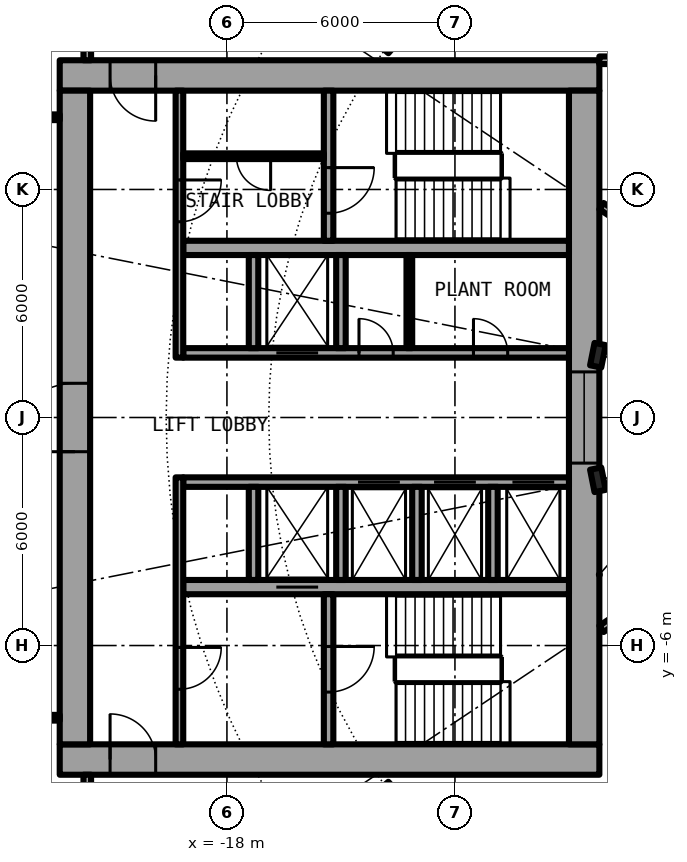
"""IFC4 building model, lengths in metres.
Left out: names, types, materials, properties, quantities, classifications, styles, units other than length and angle.
Written with IfcOpenShell. Run it as: python <this file> out.ifc"""

import sys

from ifc_helpers import new_model, si_unit, direction, frame, frame_2d, origin, origin_2d, place, context, subcontext, project, spatial, rectangle, i_section, extrude, element, fill, save


model = new_model("IFC4")
c1 = context("Model", 3, precision=1e-05, world=origin(), true_north=direction((0.0, 1.0)))
c2 = subcontext(c1, "Body", "Model", "MODEL_VIEW")
j1 = project(units=[si_unit("LENGTHUNIT", "METRE"), si_unit("PLANEANGLEUNIT", "RADIAN")], contexts=[c1])
p1 = place(None, origin())
s1 = spatial("IfcSite", under=j1, at=p1, CompositionType="ELEMENT")
p2 = place(p1, origin())
s2 = spatial("IfcBuilding", under=s1, at=p2, CompositionType="ELEMENT")
p3 = place(p2, frame((0.0, 0.0, 18.3)))
s3 = spatial("IfcBuildingStorey", under=s2, at=p3, CompositionType="ELEMENT", Elevation=18.3)
for number, where, z_axis, x_axis in (
    (1, (-8.239, 1.639, 0.0), (0.0, 0.0, 1.0), (-0.981, 0.195, 0.0)),
    (2, (-8.239, -1.639, 0.0), (0.0, 0.0, 1.0), (-0.981, -0.195, 0.0)),
):
    element("IfcColumn", number, at=place(p3, frame(where, z_axis=z_axis, x_axis=x_axis)), inside=s3, PredefinedType="COLUMN", context=c2, shape_type="SweptSolid", body=[
        extrude(i_section(OverallWidth=0.3, OverallDepth=0.6, WebThickness=0.015, FlangeThickness=0.03, FilletRadius=0.027, at=origin_2d()), origin(), (0.0, 0.0, 1.0), 4.5),
    ])
p4 = place(p3, frame((-22.4, -9.0, 0.0), z_axis=(0.0, 0.0, 1.0), x_axis=(1.0, 0.0, 0.0)))
e3 = element("IfcWall", 3, at=p4, inside=s3, PredefinedType="SHEAR", context=c2, shape_type="SweptSolid", body=[
    extrude(rectangle(XDim=14.2, YDim=0.8, at=frame_2d((7.1, 0.0))), origin(), (0.0, 0.0, 1.0), 4.5),
])
p5 = place(p4, frame((1.325, 0.0, 0.0)))
e4 = element("IfcOpeningElement", 4, at=p5, cuts=e3, PredefinedType="OPENING", context=c2, shape_type="SweptSolid", body=[
    extrude(rectangle(XDim=1.2, YDim=2.3, at=frame_2d((0.6, 1.15))), frame((0.0, 0.41, 0.0), z_axis=(0.0, -1.0, 0.0), x_axis=(1.0, 0.0, 0.0)), (0.0, 0.0, 1.0), 0.82),
])
p6 = place(p3, frame((-8.2, 9.0, 0.0), z_axis=(0.0, 0.0, 1.0), x_axis=(-1.0, 0.0, 0.0)))
e5 = element("IfcWall", 5, at=p6, inside=s3, PredefinedType="SHEAR", context=c2, shape_type="SweptSolid", body=[
    extrude(rectangle(XDim=14.2, YDim=0.8, at=frame_2d((7.1, 0.0))), origin(), (0.0, 0.0, 1.0), 4.5),
])
p7 = place(p6, frame((11.675, 0.0, 0.0)))
e6 = element("IfcOpeningElement", 6, at=p7, cuts=e5, PredefinedType="OPENING", context=c2, shape_type="SweptSolid", body=[
    extrude(rectangle(XDim=1.2, YDim=2.3, at=frame_2d((0.6, 1.15))), frame((0.0, 0.41, 0.0), z_axis=(0.0, -1.0, 0.0), x_axis=(1.0, 0.0, 0.0)), (0.0, 0.0, 1.0), 0.82),
])
p8 = place(p3, frame((-22.0, -8.6, 0.0), z_axis=(0.0, 0.0, 1.0), x_axis=(0.0, 1.0, 0.0)))
e7 = element("IfcWall", 7, at=p8, inside=s3, PredefinedType="SHEAR", context=c2, shape_type="SweptSolid", body=[
    extrude(rectangle(XDim=17.2, YDim=0.8, at=frame_2d((8.6, 0.0))), origin(), (0.0, 0.0, 1.0), 4.5),
])
p9 = place(p8, frame((7.7, 0.0, 0.0)))
e8 = element("IfcOpeningElement", 8, at=p9, cuts=e7, PredefinedType="OPENING", context=c2, shape_type="SweptSolid", body=[
    extrude(rectangle(XDim=1.8, YDim=2.3, at=frame_2d((0.9, 1.15))), frame((0.0, 0.41, 0.0), z_axis=(0.0, -1.0, 0.0), x_axis=(1.0, 0.0, 0.0)), (0.0, 0.0, 1.0), 0.82),
])
p10 = place(p3, frame((-8.6, 8.6, 0.0), z_axis=(0.0, 0.0, 1.0), x_axis=(0.0, -1.0, 0.0)))
e9 = element("IfcWall", 9, at=p10, inside=s3, PredefinedType="SHEAR", context=c2, shape_type="SweptSolid", body=[
    extrude(rectangle(XDim=17.2, YDim=0.8, at=frame_2d((8.6, 0.0))), origin(), (0.0, 0.0, 1.0), 4.5),
])
p11 = place(p10, frame((7.4, 0.0, 0.1)))
e10 = element("IfcOpeningElement", 10, at=p11, cuts=e9, PredefinedType="OPENING", context=c2, shape_type="SweptSolid", body=[
    extrude(rectangle(XDim=2.4, YDim=2.2, at=frame_2d((1.2, 1.1))), frame((0.0, 0.41, 0.0), z_axis=(0.0, -1.0, 0.0), x_axis=(1.0, 0.0, 0.0)), (0.0, 0.0, 1.0), 0.82),
])
p12 = place(p3, frame((-9.0, -1.7, 0.0), z_axis=(0.0, 0.0, 1.0), x_axis=(-1.0, 0.0, 0.0)))
e11 = element("IfcWall", 11, at=p12, inside=s3, PredefinedType="SHEAR", context=c2, shape_type="SweptSolid", body=[
    extrude(rectangle(XDim=10.15, YDim=0.25, at=frame_2d((5.075, 0.0))), origin(), (0.0, 0.0, 1.0), 4.5),
])
p13 = place(p12, frame((0.387, 0.0, 0.0)))
e12 = element("IfcOpeningElement", 12, at=p13, cuts=e11, PredefinedType="OPENING", context=c2, shape_type="SweptSolid", body=[
    extrude(rectangle(XDim=1.1, YDim=2.3, at=frame_2d((0.55, 1.15))), frame((0.0, 0.135, 0.0), z_axis=(0.0, -1.0, 0.0), x_axis=(1.0, 0.0, 0.0)), (0.0, 0.0, 1.0), 0.27),
])
p14 = place(p12, frame((2.45, 0.0, 0.0)))
e13 = element("IfcOpeningElement", 13, at=p14, cuts=e11, PredefinedType="OPENING", context=c2, shape_type="SweptSolid", body=[
    extrude(rectangle(XDim=1.1, YDim=2.3, at=frame_2d((0.55, 1.15))), frame((0.0, 0.135, 0.0), z_axis=(0.0, -1.0, 0.0), x_axis=(1.0, 0.0, 0.0)), (0.0, 0.0, 1.0), 0.27),
])
p15 = place(p12, frame((4.45, 0.0, 0.0)))
e14 = element("IfcOpeningElement", 14, at=p15, cuts=e11, PredefinedType="OPENING", context=c2, shape_type="SweptSolid", body=[
    extrude(rectangle(XDim=1.1, YDim=2.3, at=frame_2d((0.55, 1.15))), frame((0.0, 0.135, 0.0), z_axis=(0.0, -1.0, 0.0), x_axis=(1.0, 0.0, 0.0)), (0.0, 0.0, 1.0), 0.27),
])
p16 = place(p3, frame((-9.0, -4.462, 0.0), z_axis=(0.0, 0.0, 1.0), x_axis=(-1.0, 0.0, 0.0)))
e15 = element("IfcWall", 15, at=p16, inside=s3, PredefinedType="SHEAR", context=c2, shape_type="SweptSolid", body=[
    extrude(rectangle(XDim=10.15, YDim=0.375, at=frame_2d((5.075, 0.0))), origin(), (0.0, 0.0, 1.0), 4.5),
])
p17 = place(p16, frame((6.6, 0.0, 0.0)))
e16 = element("IfcOpeningElement", 16, at=p17, cuts=e15, PredefinedType="OPENING", context=c2, shape_type="SweptSolid", body=[
    extrude(rectangle(XDim=1.1, YDim=2.3, at=frame_2d((0.55, 1.15))), frame((0.0, 0.198, 0.0), z_axis=(0.0, -1.0, 0.0), x_axis=(1.0, 0.0, 0.0)), (0.0, 0.0, 1.0), 0.395),
])
p18 = place(p3, frame((-15.325, -4.65, 0.0), z_axis=(0.0, 0.0, 1.0), x_axis=(0.0, -1.0, 0.0)))
e17 = element("IfcWall", 17, at=p18, inside=s3, PredefinedType="SHEAR", context=c2, shape_type="SweptSolid", body=[
    extrude(rectangle(XDim=3.95, YDim=0.25, at=frame_2d((1.975, 0.0))), origin(), (0.0, 0.0, 1.0), 4.5),
])
p19 = place(p18, frame((1.375, 0.0, 0.0)))
e18 = element("IfcOpeningElement", 18, at=p19, cuts=e17, PredefinedType="OPENING", context=c2, shape_type="SweptSolid", body=[
    extrude(rectangle(XDim=1.2, YDim=2.3, at=frame_2d((0.6, 1.15))), frame((0.0, 0.135, 0.0), z_axis=(0.0, -1.0, 0.0), x_axis=(1.0, 0.0, 0.0)), (0.0, 0.0, 1.0), 0.27),
])
for number, where, z_axis, x_axis in (
    (19, (-15.0, -1.825, 0.0), (0.0, 0.0, 1.0), (0.0, -1.0, 0.0)),
    (20, (-17.3, -1.825, 0.0), (0.0, 0.0, 1.0), (0.0, -1.0, 0.0)),
):
    element("IfcWall", number, at=place(p3, frame(where, z_axis=z_axis, x_axis=x_axis)), inside=s3, PredefinedType="SOLIDWALL", context=c2, shape_type="SweptSolid", body=[
        extrude(rectangle(XDim=2.45, YDim=0.25, at=frame_2d((1.225, 0.0))), origin(), (0.0, 0.0, 1.0), 4.15),
    ])
p20 = place(p3, frame((-19.25, -1.575, 0.0), z_axis=(0.0, 0.0, 1.0), x_axis=(0.0, -1.0, 0.0)))
e21 = element("IfcWall", 21, at=p20, inside=s3, PredefinedType="SOLIDWALL", context=c2, shape_type="SweptSolid", body=[
    extrude(rectangle(XDim=7.025, YDim=0.2, at=frame_2d((3.513, 0.0))), origin(), (0.0, 0.0, 1.0), 4.15),
])
p21 = place(p20, frame((4.475, 0.0, 0.0)))
e22 = element("IfcOpeningElement", 22, at=p21, cuts=e21, PredefinedType="OPENING", context=c2, shape_type="SweptSolid", body=[
    extrude(rectangle(XDim=1.1, YDim=2.3, at=frame_2d((0.55, 1.15))), frame((0.0, 0.11, 0.0), z_axis=(0.0, -1.0, 0.0), x_axis=(1.0, 0.0, 0.0)), (0.0, 0.0, 1.0), 0.22),
])
p22 = place(p3, frame((-19.15, 1.7, 0.0), z_axis=(0.0, 0.0, 1.0), x_axis=(1.0, 0.0, 0.0)))
e23 = element("IfcWall", 23, at=p22, inside=s3, PredefinedType="SHEAR", context=c2, shape_type="SweptSolid", body=[
    extrude(rectangle(XDim=10.15, YDim=0.25, at=frame_2d((5.075, 0.0))), origin(), (0.0, 0.0, 1.0), 4.5),
])
p23 = place(p22, frame((2.45, 0.0, 0.0)))
e24 = element("IfcOpeningElement", 24, at=p23, cuts=e23, PredefinedType="OPENING", context=c2, shape_type="SweptSolid", body=[
    extrude(rectangle(XDim=1.1, YDim=2.3, at=frame_2d((0.55, 1.15))), frame((0.0, 0.135, 0.0), z_axis=(0.0, -1.0, 0.0), x_axis=(1.0, 0.0, 0.0)), (0.0, 0.0, 1.0), 0.27),
])
p24 = place(p22, frame((7.637, 0.0, 0.0)))
e25 = element("IfcOpeningElement", 25, at=p24, cuts=e23, PredefinedType="OPENING", context=c2, shape_type="SweptSolid", body=[
    extrude(rectangle(XDim=0.9, YDim=2.3, at=frame_2d((0.45, 1.15))), frame((0.0, 0.135, 0.0), z_axis=(0.0, -1.0, 0.0), x_axis=(1.0, 0.0, 0.0)), (0.0, 0.0, 1.0), 0.27),
])
p25 = place(p22, frame((4.625, 0.0, 0.0)))
e26 = element("IfcOpeningElement", 26, at=p25, cuts=e23, PredefinedType="OPENING", context=c2, shape_type="SweptSolid", body=[
    extrude(rectangle(XDim=0.9, YDim=2.3, at=frame_2d((0.45, 1.15))), frame((0.0, 0.135, 0.0), z_axis=(0.0, -1.0, 0.0), x_axis=(1.0, 0.0, 0.0)), (0.0, 0.0, 1.0), 0.27),
])
p26 = place(p3, frame((-9.0, 4.462, 0.0), z_axis=(0.0, 0.0, 1.0), x_axis=(-1.0, 0.0, 0.0)))
e27 = element("IfcWall", 27, at=p26, inside=s3, PredefinedType="SHEAR", context=c2, shape_type="SweptSolid", body=[
    extrude(rectangle(XDim=10.15, YDim=0.375, at=frame_2d((5.075, 0.0))), origin(), (0.0, 0.0, 1.0), 4.5),
])
p27 = place(p3, frame((-15.325, 8.6, 0.0), z_axis=(0.0, 0.0, 1.0), x_axis=(0.0, -1.0, 0.0)))
e28 = element("IfcWall", 28, at=p27, inside=s3, PredefinedType="SHEAR", context=c2, shape_type="SweptSolid", body=[
    extrude(rectangle(XDim=3.95, YDim=0.25, at=frame_2d((1.975, 0.0))), origin(), (0.0, 0.0, 1.0), 4.5),
])
p28 = place(p27, frame((2.025, 0.0, 0.0)))
e29 = element("IfcOpeningElement", 29, at=p28, cuts=e28, PredefinedType="OPENING", context=c2, shape_type="SweptSolid", body=[
    extrude(rectangle(XDim=1.2, YDim=2.3, at=frame_2d((0.6, 1.15))), frame((0.0, 0.135, 0.0), z_axis=(0.0, -1.0, 0.0), x_axis=(1.0, 0.0, 0.0)), (0.0, 0.0, 1.0), 0.27),
])
for number, where, z_axis, x_axis in (
    (30, (-15.0, 1.825, 0.0), (0.0, 0.0, 1.0), (0.0, 1.0, 0.0)),
    (31, (-17.3, 1.825, 0.0), (0.0, 0.0, 1.0), (0.0, 1.0, 0.0)),
):
    element("IfcWall", number, at=place(p3, frame(where, z_axis=z_axis, x_axis=x_axis)), inside=s3, PredefinedType="SOLIDWALL", context=c2, shape_type="SweptSolid", body=[
        extrude(rectangle(XDim=2.45, YDim=0.25, at=frame_2d((1.225, 0.0))), origin(), (0.0, 0.0, 1.0), 4.15),
    ])
p29 = place(p3, frame((-19.25, 8.6, 0.0), z_axis=(0.0, 0.0, 1.0), x_axis=(0.0, -1.0, 0.0)))
e32 = element("IfcWall", 32, at=p29, inside=s3, PredefinedType="SOLIDWALL", context=c2, shape_type="SweptSolid", body=[
    extrude(rectangle(XDim=7.025, YDim=0.2, at=frame_2d((3.513, 0.0))), origin(), (0.0, 0.0, 1.0), 4.15),
])
p30 = place(p29, frame((2.35, 0.0, 0.0)))
e33 = element("IfcOpeningElement", 33, at=p30, cuts=e32, PredefinedType="OPENING", context=c2, shape_type="SweptSolid", body=[
    extrude(rectangle(XDim=1.1, YDim=2.3, at=frame_2d((0.55, 1.15))), frame((0.0, 0.11, 0.0), z_axis=(0.0, -1.0, 0.0), x_axis=(1.0, 0.0, 0.0)), (0.0, 0.0, 1.0), 0.22),
])
for number, where, z_axis, x_axis in (
    (34, (-11.0, -1.825, 0.0), (0.0, 0.0, 1.0), (0.0, -1.0, 0.0)),
    (35, (-13.0, -1.825, 0.0), (0.0, 0.0, 1.0), (0.0, -1.0, 0.0)),
):
    element("IfcWall", number, at=place(p3, frame(where, z_axis=z_axis, x_axis=x_axis)), inside=s3, PredefinedType="SOLIDWALL", context=c2, shape_type="SweptSolid", body=[
        extrude(rectangle(XDim=2.45, YDim=0.25, at=frame_2d((1.225, 0.0))), origin(), (0.0, 0.0, 1.0), 4.15),
    ])
p31 = place(p3, frame((-13.2, 1.825, 0.0), z_axis=(0.0, 0.0, 1.0), x_axis=(0.0, 1.0, 0.0)))
e36 = element("IfcWall", 36, at=p31, inside=s3, PredefinedType="PARTITIONING", context=c2, shape_type="SweptSolid", body=[
    extrude(rectangle(XDim=2.45, YDim=0.15, at=frame_2d((1.225, 0.0))), origin(), (0.0, 0.0, 1.0), 4.15),
])
p32 = place(p3, frame((-15.45, 6.875, 0.0), z_axis=(0.0, 0.0, 1.0), x_axis=(-1.0, 0.0, 0.0)))
e37 = element("IfcWall", 37, at=p32, inside=s3, PredefinedType="PARTITIONING", context=c2, shape_type="SweptSolid", body=[
    extrude(rectangle(XDim=3.7, YDim=0.15, at=frame_2d((1.85, 0.0))), origin(), (0.0, 0.0, 1.0), 4.15),
])
p33 = place(p32, frame((1.4, 0.0, 0.0)))
e38 = element("IfcOpeningElement", 38, at=p33, cuts=e37, PredefinedType="OPENING", context=c2, shape_type="SweptSolid", body=[
    extrude(rectangle(XDim=0.9, YDim=2.3, at=frame_2d((0.45, 1.15))), frame((0.0, 0.085, 0.0), z_axis=(0.0, -1.0, 0.0), x_axis=(1.0, 0.0, 0.0)), (0.0, 0.0, 1.0), 0.17),
])
for number, where, z_axis, x_axis in (
    (39, (-22.4, 7.9, 0.0), (0.0, 0.0, 1.0), (-1.0, 0.0, 0.0)),
    (40, (-22.4, -7.9, 0.0), (0.0, 0.0, 1.0), (-1.0, 0.0, 0.0)),
):
    element("IfcWall", number, at=place(p3, frame(where, z_axis=z_axis, x_axis=x_axis)), inside=s3, PredefinedType="PARTITIONING", context=c2, shape_type="SweptSolid", body=[
        extrude(rectangle(XDim=2.54, YDim=0.15, at=frame_2d((1.27, 0.0))), origin(), (0.0, 0.0, 1.0), 4.15),
    ])
p34 = place(p3, frame((-13.827, -9.65, 0.0), z_axis=(0.0, 0.0, 1.0), x_axis=(0.653220956969, -0.757167340406, 0.0)))
e41 = element("IfcWall", 41, at=p34, inside=s3, PredefinedType="PARTITIONING", context=c2, shape_type="SweptSolid", body=[
    extrude(rectangle(XDim=3.793, YDim=0.2, at=frame_2d((1.896, 0.0))), origin(), (0.0, 0.0, 1.0), 4.15),
])
p35 = place(p3, frame((-6.513, -4.472, 0.0), z_axis=(0.0, 0.0, 1.0), x_axis=(-0.831417956244, -0.555647533996, 0.0)))
e42 = element("IfcWall", 42, at=p35, inside=s3, PredefinedType="PARTITIONING", context=c2, shape_type="SweptSolid", body=[
    extrude(rectangle(XDim=1.962, YDim=0.2, at=frame_2d((0.981, 0.0))), origin(), (0.0, 0.0, 1.0), 4.15),
])
p36 = place(p3, frame((-7.969, 14.903, 0.0), z_axis=(0.0, 0.0, 1.0), x_axis=(0.471532005808, -0.881848948232, 0.0)))
e43 = element("IfcWall", 43, at=p36, inside=s3, PredefinedType="PARTITIONING", context=c2, shape_type="SweptSolid", body=[
    extrude(rectangle(XDim=6.242, YDim=0.2, at=frame_2d((3.121, 0.0))), origin(), (0.0, 0.0, 1.0), 4.15),
])
p37 = place(p3, frame((-7.966, -14.905, 0.0), z_axis=(0.0, 0.0, 1.0), x_axis=(0.471460365694, 0.881887251059, 0.0)))
e44 = element("IfcWall", 44, at=p37, inside=s3, PredefinedType="PARTITIONING", context=c2, shape_type="SweptSolid", body=[
    extrude(rectangle(XDim=9.18, YDim=0.2, at=frame_2d((4.59, 0.0))), origin(), (0.0, 0.0, 1.0), 4.15),
])
p38 = place(p3, frame((-6.513, 4.472, 0.0), z_axis=(0.0, 0.0, 1.0), x_axis=(-0.831417956244, 0.555647533996, 0.0)))
e45 = element("IfcWall", 45, at=p38, inside=s3, PredefinedType="PARTITIONING", context=c2, shape_type="SweptSolid", body=[
    extrude(rectangle(XDim=1.962, YDim=0.2, at=frame_2d((0.981, 0.0))), origin(), (0.0, 0.0, 1.0), 4.15),
])
p39 = place(p3, frame((-8.2, 9.4, 0.0), z_axis=(0.0, 0.0, 1.0), x_axis=(1.0, 0.0, 0.0)))
e46 = element("IfcWall", 46, at=p39, inside=s3, PredefinedType="PARTITIONING", context=c2, shape_type="SweptSolid", body=[
    extrude(rectangle(XDim=3.175, YDim=0.2, at=frame_2d((1.587, 0.0))), origin(), (0.0, 0.0, 1.0), 4.15),
])
p40 = place(p3, frame((-13.827, 9.65, 0.0), z_axis=(0.0, 0.0, 1.0), x_axis=(0.653220956969, 0.757167340406, 0.0)))
e47 = element("IfcWall", 47, at=p40, inside=s3, PredefinedType="PARTITIONING", context=c2, shape_type="SweptSolid", body=[
    extrude(rectangle(XDim=3.793, YDim=0.2, at=frame_2d((1.896, 0.0))), origin(), (0.0, 0.0, 1.0), 4.15),
])
for number, where, z_axis, x_axis in (
    (48, (-21.675, -11.0, 0.0), (0.0, 0.0, 1.0), (0.0, 1.0, 0.0)),
    (49, (-21.675, 9.4, 0.0), (0.0, 0.0, 1.0), (0.0, 1.0, 0.0)),
):
    element("IfcWall", number, at=place(p3, frame(where, z_axis=z_axis, x_axis=x_axis)), inside=s3, PredefinedType="PARTITIONING", context=c2, shape_type="SweptSolid", body=[
        extrude(rectangle(XDim=1.6, YDim=0.2, at=frame_2d((0.8, 0.0))), origin(), (0.0, 0.0, 1.0), 4.15),
    ])
p41 = place(p13, origin())
e50 = element("IfcDoor", 50, at=p41, inside=s3, OperationType="DOUBLE_DOOR_SLIDING", PredefinedType="DOOR", context=c2, shape_type="SweptSolid", body=[
    extrude(rectangle(XDim=1.1, YDim=2.3, at=frame_2d((0.55, 1.15))), frame((0.0, 0.025, 0.0), z_axis=(0.0, -1.0, 0.0), x_axis=(1.0, 0.0, 0.0)), (0.0, 0.0, 1.0), 0.05),
])
fill(e12, e50)
p42 = place(p14, origin())
e51 = element("IfcDoor", 51, at=p42, inside=s3, OperationType="DOUBLE_DOOR_SLIDING", PredefinedType="DOOR", context=c2, shape_type="SweptSolid", body=[
    extrude(rectangle(XDim=1.1, YDim=2.3, at=frame_2d((0.55, 1.15))), frame((0.0, 0.025, 0.0), z_axis=(0.0, -1.0, 0.0), x_axis=(1.0, 0.0, 0.0)), (0.0, 0.0, 1.0), 0.05),
])
fill(e13, e51)
p43 = place(p15, origin())
e52 = element("IfcDoor", 52, at=p43, inside=s3, OperationType="DOUBLE_DOOR_SLIDING", PredefinedType="DOOR", context=c2, shape_type="SweptSolid", body=[
    extrude(rectangle(XDim=1.1, YDim=2.3, at=frame_2d((0.55, 1.15))), frame((0.0, 0.025, 0.0), z_axis=(0.0, -1.0, 0.0), x_axis=(1.0, 0.0, 0.0)), (0.0, 0.0, 1.0), 0.05),
])
fill(e14, e52)
p44 = place(p17, origin())
e53 = element("IfcDoor", 53, at=p44, inside=s3, OperationType="DOUBLE_DOOR_SLIDING", PredefinedType="DOOR", context=c2, shape_type="SweptSolid", body=[
    extrude(rectangle(XDim=1.1, YDim=2.3, at=frame_2d((0.55, 1.15))), frame((0.0, 0.025, 0.0), z_axis=(0.0, -1.0, 0.0), x_axis=(1.0, 0.0, 0.0)), (0.0, 0.0, 1.0), 0.05),
])
fill(e16, e53)
p45 = place(p23, origin())
e54 = element("IfcDoor", 54, at=p45, inside=s3, OperationType="DOUBLE_DOOR_SLIDING", PredefinedType="DOOR", context=c2, shape_type="SweptSolid", body=[
    extrude(rectangle(XDim=1.1, YDim=2.3, at=frame_2d((0.55, 1.15))), frame((0.0, 0.025, 0.0), z_axis=(0.0, -1.0, 0.0), x_axis=(1.0, 0.0, 0.0)), (0.0, 0.0, 1.0), 0.05),
])
fill(e24, e54)
p46 = place(p24, origin())
e55 = element("IfcDoor", 55, at=p46, inside=s3, OperationType="SINGLE_SWING_LEFT", PredefinedType="DOOR", context=c2, shape_type="SweptSolid", body=[
    extrude(rectangle(XDim=0.9, YDim=2.3, at=frame_2d((0.45, 1.15))), frame((0.0, 0.025, 0.0), z_axis=(0.0, -1.0, 0.0), x_axis=(1.0, 0.0, 0.0)), (0.0, 0.0, 1.0), 0.05),
])
fill(e25, e55)
p47 = place(p25, origin())
e56 = element("IfcDoor", 56, at=p47, inside=s3, OperationType="SINGLE_SWING_LEFT", PredefinedType="DOOR", context=c2, shape_type="SweptSolid", body=[
    extrude(rectangle(XDim=0.9, YDim=2.3, at=frame_2d((0.45, 1.15))), frame((0.0, 0.025, 0.0), z_axis=(0.0, -1.0, 0.0), x_axis=(1.0, 0.0, 0.0)), (0.0, 0.0, 1.0), 0.05),
])
fill(e26, e56)
p48 = place(p33, origin())
e57 = element("IfcDoor", 57, at=p48, inside=s3, OperationType="SINGLE_SWING_LEFT", PredefinedType="DOOR", context=c2, shape_type="SweptSolid", body=[
    extrude(rectangle(XDim=0.9, YDim=2.3, at=frame_2d((0.45, 1.15))), frame((0.0, 0.025, 0.0), z_axis=(0.0, -1.0, 0.0), x_axis=(1.0, 0.0, 0.0)), (0.0, 0.0, 1.0), 0.05),
])
fill(e38, e57)
p49 = place(p19, origin())
e58 = element("IfcDoor", 58, at=p49, inside=s3, OperationType="SINGLE_SWING_LEFT", PredefinedType="DOOR", context=c2, shape_type="SweptSolid", body=[
    extrude(rectangle(XDim=1.2, YDim=2.3, at=frame_2d((0.6, 1.15))), frame((0.0, 0.025, 0.0), z_axis=(0.0, -1.0, 0.0), x_axis=(1.0, 0.0, 0.0)), (0.0, 0.0, 1.0), 0.05),
])
fill(e18, e58)
p50 = place(p28, origin())
e59 = element("IfcDoor", 59, at=p50, inside=s3, OperationType="SINGLE_SWING_LEFT", PredefinedType="DOOR", context=c2, shape_type="SweptSolid", body=[
    extrude(rectangle(XDim=1.2, YDim=2.3, at=frame_2d((0.6, 1.15))), frame((0.0, 0.025, 0.0), z_axis=(0.0, -1.0, 0.0), x_axis=(1.0, 0.0, 0.0)), (0.0, 0.0, 1.0), 0.05),
])
fill(e29, e59)
p51 = place(p21, origin())
e60 = element("IfcDoor", 60, at=p51, inside=s3, OperationType="SINGLE_SWING_LEFT", PredefinedType="DOOR", context=c2, shape_type="SweptSolid", body=[
    extrude(rectangle(XDim=1.1, YDim=2.3, at=frame_2d((0.55, 1.15))), frame((0.0, 0.025, 0.0), z_axis=(0.0, -1.0, 0.0), x_axis=(1.0, 0.0, 0.0)), (0.0, 0.0, 1.0), 0.05),
])
fill(e22, e60)
p52 = place(p30, origin())
e61 = element("IfcDoor", 61, at=p52, inside=s3, OperationType="SINGLE_SWING_RIGHT", PredefinedType="DOOR", context=c2, shape_type="SweptSolid", body=[
    extrude(rectangle(XDim=1.1, YDim=2.3, at=frame_2d((0.55, 1.15))), frame((0.0, 0.025, 0.0), z_axis=(0.0, -1.0, 0.0), x_axis=(1.0, 0.0, 0.0)), (0.0, 0.0, 1.0), 0.05),
])
fill(e33, e61)
p53 = place(p5, origin())
e62 = element("IfcDoor", 62, at=p53, inside=s3, OperationType="SINGLE_SWING_RIGHT", PredefinedType="DOOR", context=c2, shape_type="SweptSolid", body=[
    extrude(rectangle(XDim=1.2, YDim=2.3, at=frame_2d((0.6, 1.15))), frame((0.0, 0.025, 0.0), z_axis=(0.0, -1.0, 0.0), x_axis=(1.0, 0.0, 0.0)), (0.0, 0.0, 1.0), 0.05),
])
fill(e4, e62)
p54 = place(p7, origin())
e63 = element("IfcDoor", 63, at=p54, inside=s3, OperationType="SINGLE_SWING_LEFT", PredefinedType="DOOR", context=c2, shape_type="SweptSolid", body=[
    extrude(rectangle(XDim=1.2, YDim=2.3, at=frame_2d((0.6, 1.15))), frame((0.0, 0.025, 0.0), z_axis=(0.0, -1.0, 0.0), x_axis=(1.0, 0.0, 0.0)), (0.0, 0.0, 1.0), 0.05),
])
fill(e6, e63)
p55 = place(p9, origin())
e64 = element("IfcDoor", 64, at=p55, inside=s3, OperationType="SINGLE_SWING_LEFT", PredefinedType="DOOR", context=c2, shape_type="SweptSolid", body=[
    extrude(rectangle(XDim=1.8, YDim=2.3, at=frame_2d((0.9, 1.15))), frame((0.0, 0.025, 0.0), z_axis=(0.0, -1.0, 0.0), x_axis=(1.0, 0.0, 0.0)), (0.0, 0.0, 1.0), 0.05),
])
fill(e8, e64)
p56 = place(p11, origin())
e65 = element("IfcWindow", 65, at=p56, inside=s3, PartitioningType="SINGLE_PANEL", PredefinedType="WINDOW", context=c2, shape_type="SweptSolid", body=[
    extrude(rectangle(XDim=2.4, YDim=2.2, at=frame_2d((1.2, 1.1))), frame((0.0, 0.03, 0.0), z_axis=(0.0, -1.0, 0.0), x_axis=(1.0, 0.0, 0.0)), (0.0, 0.0, 1.0), 0.06),
])
fill(e10, e65)
save(model, sys.argv[1])
